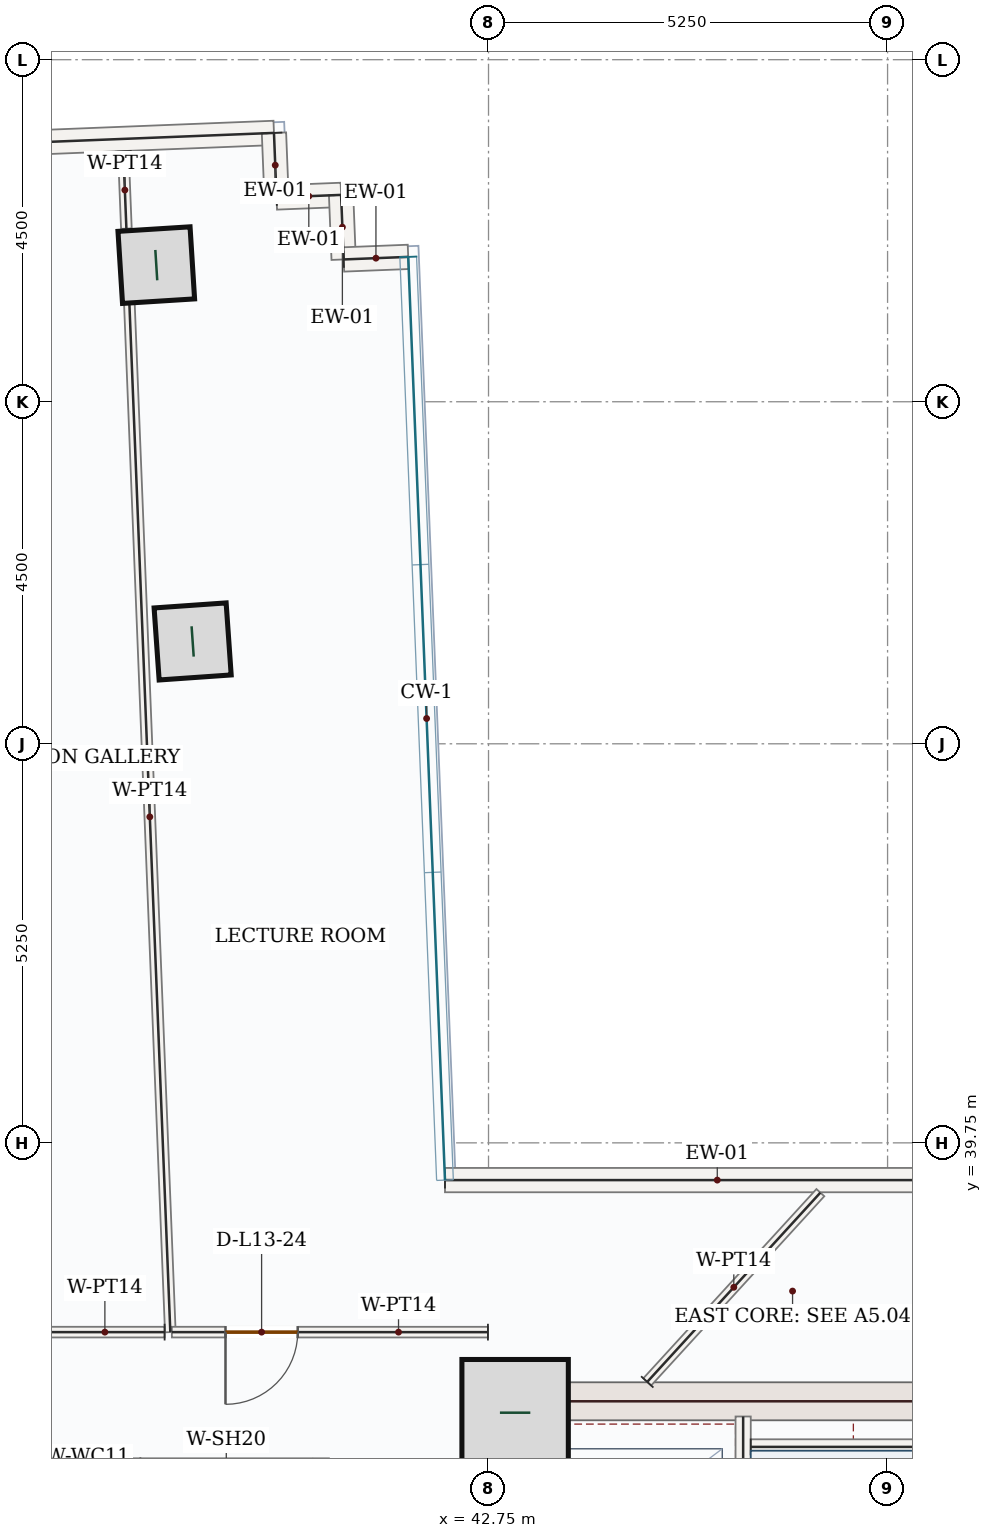
"""IFC4 building model, lengths in metres.
Left out: names, types, materials, properties, quantities, classifications, styles, units other than length and angle.
Written with IfcOpenShell. Run it as: python <this file> out.ifc"""

import sys

from ifc_helpers import new_model, si_unit, direction, frame, frame_2d, origin, origin_2d, place, context, subcontext, project, spatial, rectangle, hollow_rectangle, extrude, source, transform, mapped, element, fill, save


model = new_model("IFC4")
c1 = context("Model", 3, precision=1e-05, world=origin(), true_north=direction((0.0, 1.0)))
c2 = subcontext(c1, "Body", "Model", "MODEL_VIEW")
j1 = project(units=[si_unit("LENGTHUNIT", "METRE"), si_unit("PLANEANGLEUNIT", "RADIAN")], contexts=[c1])
p1 = place(None, origin())
s1 = spatial("IfcSite", under=j1, at=p1, CompositionType="ELEMENT")
p2 = place(p1, origin())
s2 = spatial("IfcBuilding", under=s1, at=p2, CompositionType="ELEMENT")
p3 = place(p2, frame((0.0, 0.0, 62.7)))
s3 = spatial("IfcBuildingStorey", under=s2, at=p3, CompositionType="ELEMENT", Elevation=62.7)
p4 = place(p3, frame((43.0, 28.05, 0.0), z_axis=(0.0, 0.0, 1.0), x_axis=(0.0, 1.0, 0.0)))
e1 = element("IfcWall", 1, at=p4, inside=s3, PredefinedType="SHEAR", context=c2, shape_type="SweptSolid", body=[
    extrude(rectangle(XDim=8.55, YDim=0.5, at=frame_2d((4.275, 0.0))), origin(), (0.0, 0.0, 1.0), 3.95),
])
p5 = place(p4, frame((1.5, 0.0, 0.0)))
e2 = element("IfcOpeningElement", 2, at=p5, cuts=e1, PredefinedType="OPENING", context=c2, shape_type="SweptSolid", body=[
    extrude(rectangle(XDim=1.1, YDim=2.2, at=frame_2d((0.55, 1.1))), frame((0.0, 0.26, 0.0), z_axis=(0.0, -1.0, 0.0), x_axis=(1.0, 0.0, 0.0)), (0.0, 0.0, 1.0), 0.52),
])
m1 = source(origin(), c2, "Body", "SweptSolid", [
    extrude(rectangle(XDim=7.0, YDim=0.5, at=frame_2d((3.5, 0.0))), origin(), (0.0, 0.0, 1.0), 3.95),
])
p6 = place(p3, frame((43.25, 36.35, 0.0), z_axis=(0.0, 0.0, 1.0), x_axis=(1.0, 0.0, 0.0)))
e3 = element("IfcWall", 3, at=p6, inside=s3, PredefinedType="SHEAR", context=c2, shape_type="MappedRepresentation", body=[
    mapped(m1, transform((0.0, 0.0, 0.0), x_axis=(1.0, 0.0, 0.0), y_axis=(0.0, 1.0, 0.0), z_axis=(0.0, 0.0, 1.0), scale=1.0)),
])
m2 = source(origin(), c2, "Body", "SweptSolid", [
    extrude(rectangle(XDim=1.4, YDim=1.4, at=origin_2d()), origin(), (0.0, 0.0, 1.0), 4.2),
])
p7 = place(p3, frame((43.1, 36.2, 0.0), z_axis=(0.0, 0.0, 1.0), x_axis=(1.0, 0.0, 0.0)))
e4 = element("IfcColumn", 4, at=p7, inside=s3, PredefinedType="COLUMN", context=c2, shape_type="MappedRepresentation", body=[
    mapped(m2, transform((0.0, 0.0, 0.0), x_axis=(1.0, 0.0, 0.0), y_axis=(0.0, 1.0, 0.0), z_axis=(0.0, 0.0, 1.0), scale=1.0)),
])
m3 = source(origin(), c2, "Body", "SweptSolid", [
    extrude(hollow_rectangle(XDim=0.95, YDim=0.95, WallThickness=0.05, at=origin_2d()), origin(), (0.0, 0.0, 1.0), 4.2),
])
for number, where, z_axis, x_axis in (
    (5, (38.857, 46.346, 0.0), (0.0, 0.0, 1.0), (-0.07, 0.998, 0.0)),
    (6, (38.379, 51.297, 0.0), (0.0, 0.0, 1.0), (-0.063, 0.998, 0.0)),
):
    element("IfcColumn", number, at=place(p3, frame(where, z_axis=z_axis, x_axis=x_axis)), inside=s3, PredefinedType="COLUMN", context=c2, shape_type="MappedRepresentation", body=[
        mapped(m3, transform((0.0, 0.0, 0.0), x_axis=(1.0, 0.0, 0.0), y_axis=(0.0, 1.0, 0.0), z_axis=(0.0, 0.0, 1.0), scale=1.0)),
    ])
m4 = source(origin(), c2, "Body", "SweptSolid", [
    extrude(rectangle(XDim=9.92, YDim=0.32, at=frame_2d((4.96, 0.0))), origin(), (0.0, 0.0, 1.0), 3.95),
])
p8 = place(p3, frame((30.015, 52.642, 0.0), z_axis=(0.0, 0.0, 1.0), x_axis=(0.999207823998, 0.039796035749, 0.0)))
e7 = element("IfcWall", 7, at=p8, inside=s3, PredefinedType="SOLIDWALL", context=c2, shape_type="MappedRepresentation", body=[
    mapped(m4, transform((0.0, 0.0, 0.0), x_axis=(1.0, 0.0, 0.0), y_axis=(0.0, 1.0, 0.0), z_axis=(0.0, 0.0, 1.0), scale=1.0)),
])
m5 = source(origin(), c2, "Body", "SweptSolid", [
    extrude(rectangle(XDim=0.85, YDim=0.32, at=frame_2d((0.425, 0.0))), origin(), (0.0, 0.0, 1.0), 3.95),
])
p9 = place(p3, frame((39.927, 53.037, 0.0), z_axis=(0.0, 0.0, 1.0), x_axis=(0.039922158152, -0.999202792875, 0.0)))
e8 = element("IfcWall", 8, at=p9, inside=s3, PredefinedType="SOLIDWALL", context=c2, shape_type="MappedRepresentation", body=[
    mapped(m5, transform((0.0, 0.0, 0.0), x_axis=(1.0, 0.0, 0.0), y_axis=(0.0, 1.0, 0.0), z_axis=(0.0, 0.0, 1.0), scale=1.0)),
])
m6 = source(origin(), c2, "Body", "SweptSolid", [
    extrude(rectangle(XDim=0.85, YDim=0.32, at=frame_2d((0.425, 0.0))), origin(), (0.0, 0.0, 1.0), 3.95),
])
for number, where, z_axis, x_axis in (
    (9, (39.961, 52.188, 0.0), (0.0, 0.0, 1.0), (0.999, 0.04, 0.0)),
    (10, (40.81, 52.221, 0.0), (0.0, 0.0, 1.0), (0.04, -0.999, 0.0)),
):
    element("IfcWall", number, at=place(p3, frame(where, z_axis=z_axis, x_axis=x_axis)), inside=s3, PredefinedType="SOLIDWALL", context=c2, shape_type="MappedRepresentation", body=[
        mapped(m6, transform((0.0, 0.0, 0.0), x_axis=(1.0, 0.0, 0.0), y_axis=(0.0, 1.0, 0.0), z_axis=(0.0, 0.0, 1.0), scale=1.0)),
    ])
p10 = place(p3, frame((40.844, 51.372, 0.0), z_axis=(0.0, 0.0, 1.0), x_axis=(0.999214208752, 0.039635401209, 0.0)))
e11 = element("IfcWall", 11, at=p10, inside=s3, PredefinedType="SOLIDWALL", context=c2, shape_type="MappedRepresentation", body=[
    mapped(m5, transform((0.0, 0.0, 0.0), x_axis=(1.0, 0.0, 0.0), y_axis=(0.0, 1.0, 0.0), z_axis=(0.0, 0.0, 1.0), scale=1.0)),
])
m7 = source(origin(), c2, "Body", "SweptSolid", [
    extrude(rectangle(XDim=7.165, YDim=0.32, at=frame_2d((3.583, 0.0))), origin(), (0.0, 0.0, 1.0), 3.95),
])
p11 = place(p3, frame((42.177, 39.26, 0.0), z_axis=(0.0, 0.0, 1.0), x_axis=(1.0, 0.0, 0.0)))
e12 = element("IfcWall", 12, at=p11, inside=s3, PredefinedType="SOLIDWALL", context=c2, shape_type="MappedRepresentation", body=[
    mapped(m7, transform((0.0, 0.0, 0.0), x_axis=(1.0, 0.0, 0.0), y_axis=(0.0, 1.0, 0.0), z_axis=(0.0, 0.0, 1.0), scale=1.0)),
])
p12 = place(p3, frame((46.1, 28.15, 0.0), z_axis=(0.0, 0.0, 1.0), x_axis=(0.0, 1.0, 0.0)))
e13 = element("IfcWall", 13, at=p12, inside=s3, PredefinedType="SOLIDWALL", context=c2, shape_type="SweptSolid", body=[
    extrude(rectangle(XDim=8.0, YDim=0.2, at=frame_2d((4.0, 0.0))), origin(), (0.0, 0.0, 1.0), 3.95),
])
p13 = place(p12, frame((0.4, 0.0, 0.0)))
e14 = element("IfcOpeningElement", 14, at=p13, cuts=e13, PredefinedType="OPENING", context=c2, shape_type="SweptSolid", body=[
    extrude(rectangle(XDim=1.05, YDim=2.15, at=frame_2d((0.525, 1.075))), frame((0.0, 0.11, 0.0), z_axis=(0.0, -1.0, 0.0), x_axis=(1.0, 0.0, 0.0)), (0.0, 0.0, 1.0), 0.22),
])
m8 = source(origin(), c2, "Body", "SweptSolid", [
    extrude(rectangle(XDim=3.25, YDim=0.2, at=frame_2d((1.625, 0.0))), origin(), (0.0, 0.0, 1.0), 3.95),
])
p14 = place(p3, frame((46.2, 35.75, 0.0), z_axis=(0.0, 0.0, 1.0), x_axis=(1.0, 0.0, 0.0)))
e15 = element("IfcWall", 15, at=p14, inside=s3, PredefinedType="SOLIDWALL", context=c2, shape_type="MappedRepresentation", body=[
    mapped(m8, transform((0.0, 0.0, 0.0), x_axis=(1.0, 0.0, 0.0), y_axis=(0.0, 1.0, 0.0), z_axis=(0.0, 0.0, 1.0), scale=1.0)),
])
m9 = source(origin(), c2, "Body", "SweptSolid", [
    extrude(rectangle(XDim=2.4, YDim=0.2, at=frame_2d((1.2, 0.0))), origin(), (0.0, 0.0, 1.0), 3.95),
])
for number, where, z_axis, x_axis in (
    (16, (38.05, 33.2, 0.0), (0.0, 0.0, 1.0), (0.0, 1.0, 0.0)),
    (17, (40.55, 33.2, 0.0), (0.0, 0.0, 1.0), (0.0, 1.0, 0.0)),
):
    element("IfcWall", number, at=place(p3, frame(where, z_axis=z_axis, x_axis=x_axis)), inside=s3, PredefinedType="SOLIDWALL", context=c2, shape_type="MappedRepresentation", body=[
        mapped(m9, transform((0.0, 0.0, 0.0), x_axis=(1.0, 0.0, 0.0), y_axis=(0.0, 1.0, 0.0), z_axis=(0.0, 0.0, 1.0), scale=1.0)),
    ])
m10 = source(origin(), c2, "Body", "SweptSolid", [
    extrude(rectangle(XDim=1.016, YDim=0.14, at=frame_2d((0.508, 0.0))), origin(), (0.0, 0.0, 1.0), 3.95),
])
p15 = place(p3, frame((37.945, 52.793, 0.0), z_axis=(0.0, 0.0, 1.0), x_axis=(0.03988168596, -0.99920440908, 0.0)))
e18 = element("IfcWall", 18, at=p15, inside=s3, PredefinedType="PARTITIONING", context=c2, shape_type="MappedRepresentation", body=[
    mapped(m10, transform((0.0, 0.0, 0.0), x_axis=(1.0, 0.0, 0.0), y_axis=(0.0, 1.0, 0.0), z_axis=(0.0, 0.0, 1.0), scale=1.0)),
])
m11 = source(origin(), c2, "Body", "SweptSolid", [
    extrude(rectangle(XDim=13.568, YDim=0.14, at=frame_2d((6.784, 0.0))), origin(), (0.0, 0.0, 1.0), 3.95),
])
p16 = place(p3, frame((38.024, 50.817, 0.0), z_axis=(0.0, 0.0, 1.0), x_axis=(0.039766111253, -0.99920901537, 0.0)))
e19 = element("IfcWall", 19, at=p16, inside=s3, PredefinedType="PARTITIONING", context=c2, shape_type="MappedRepresentation", body=[
    mapped(m11, transform((0.0, 0.0, 0.0), x_axis=(1.0, 0.0, 0.0), y_axis=(0.0, 1.0, 0.0), z_axis=(0.0, 0.0, 1.0), scale=1.0)),
])
p17 = place(p3, frame((38.489, 37.26, 0.0), z_axis=(0.0, 0.0, 1.0), x_axis=(-1.0, 0.0, 0.0)))
e20 = element("IfcWall", 20, at=p17, inside=s3, PredefinedType="PARTITIONING", context=c2, shape_type="SweptSolid", body=[
    extrude(rectangle(XDim=3.157, YDim=0.14, at=frame_2d((1.579, 0.0))), origin(), (0.0, 0.0, 1.0), 3.95),
])
p18 = place(p17, frame((1.722, 0.0, 0.0)))
e21 = element("IfcOpeningElement", 21, at=p18, cuts=e20, PredefinedType="OPENING", context=c2, shape_type="SweptSolid", body=[
    extrude(rectangle(XDim=0.95, YDim=2.15, at=frame_2d((0.475, 1.075))), frame((0.0, 0.08, 0.0), z_axis=(0.0, -1.0, 0.0), x_axis=(1.0, 0.0, 0.0)), (0.0, 0.0, 1.0), 0.16),
])
m12 = source(origin(), c2, "Body", "SweptSolid", [
    extrude(rectangle(XDim=3.375, YDim=0.14, at=frame_2d((1.688, 0.0))), origin(), (0.0, 0.0, 1.0), 3.95),
])
p19 = place(p3, frame((44.838, 36.605, 0.0), z_axis=(0.0, 0.0, 1.0), x_axis=(0.674974079893, 0.737841440604, 0.0)))
e22 = element("IfcWall", 22, at=p19, inside=s3, PredefinedType="PARTITIONING", context=c2, shape_type="MappedRepresentation", body=[
    mapped(m12, transform((0.0, 0.0, 0.0), x_axis=(1.0, 0.0, 0.0), y_axis=(0.0, 1.0, 0.0), z_axis=(0.0, 0.0, 1.0), scale=1.0)),
])
p20 = place(p3, frame((42.742, 37.26, 0.0), z_axis=(0.0, 0.0, 1.0), x_axis=(-0.999999998277, 5.8706117e-05, 0.0)))
e23 = element("IfcWall", 23, at=p20, inside=s3, PredefinedType="PARTITIONING", context=c2, shape_type="SweptSolid", body=[
    extrude(rectangle(XDim=4.159, YDim=0.14, at=frame_2d((2.079, 0.0))), origin(), (0.0, 0.0, 1.0), 3.95),
])
p21 = place(p20, frame((2.503, 0.0, 0.0)))
e24 = element("IfcOpeningElement", 24, at=p21, cuts=e23, PredefinedType="OPENING", context=c2, shape_type="SweptSolid", body=[
    extrude(rectangle(XDim=0.95, YDim=2.15, at=frame_2d((0.475, 1.075))), frame((0.0, 0.08, 0.0), z_axis=(0.0, -1.0, 0.0), x_axis=(1.0, 0.0, 0.0)), (0.0, 0.0, 1.0), 0.16),
])
m13 = source(origin(), c2, "Body", "SweptSolid", [
    extrude(rectangle(XDim=0.95, YDim=2.15, at=frame_2d((0.475, 1.075))), frame((0.0, 0.025, 0.0), z_axis=(0.0, -1.0, 0.0), x_axis=(1.0, 0.0, 0.0)), (0.0, 0.0, 1.0), 0.05),
])
p22 = place(p21, origin())
e25 = element("IfcDoor", 25, at=p22, inside=s3, OperationType="SINGLE_SWING_RIGHT", PredefinedType="DOOR", context=c2, shape_type="MappedRepresentation", body=[
    mapped(m13, transform((0.0, 0.0, 0.0), x_axis=(1.0, 0.0, 0.0), y_axis=(0.0, 1.0, 0.0), z_axis=(0.0, 0.0, 1.0), scale=1.0)),
])
fill(e24, e25)
save(model, sys.argv[1])
